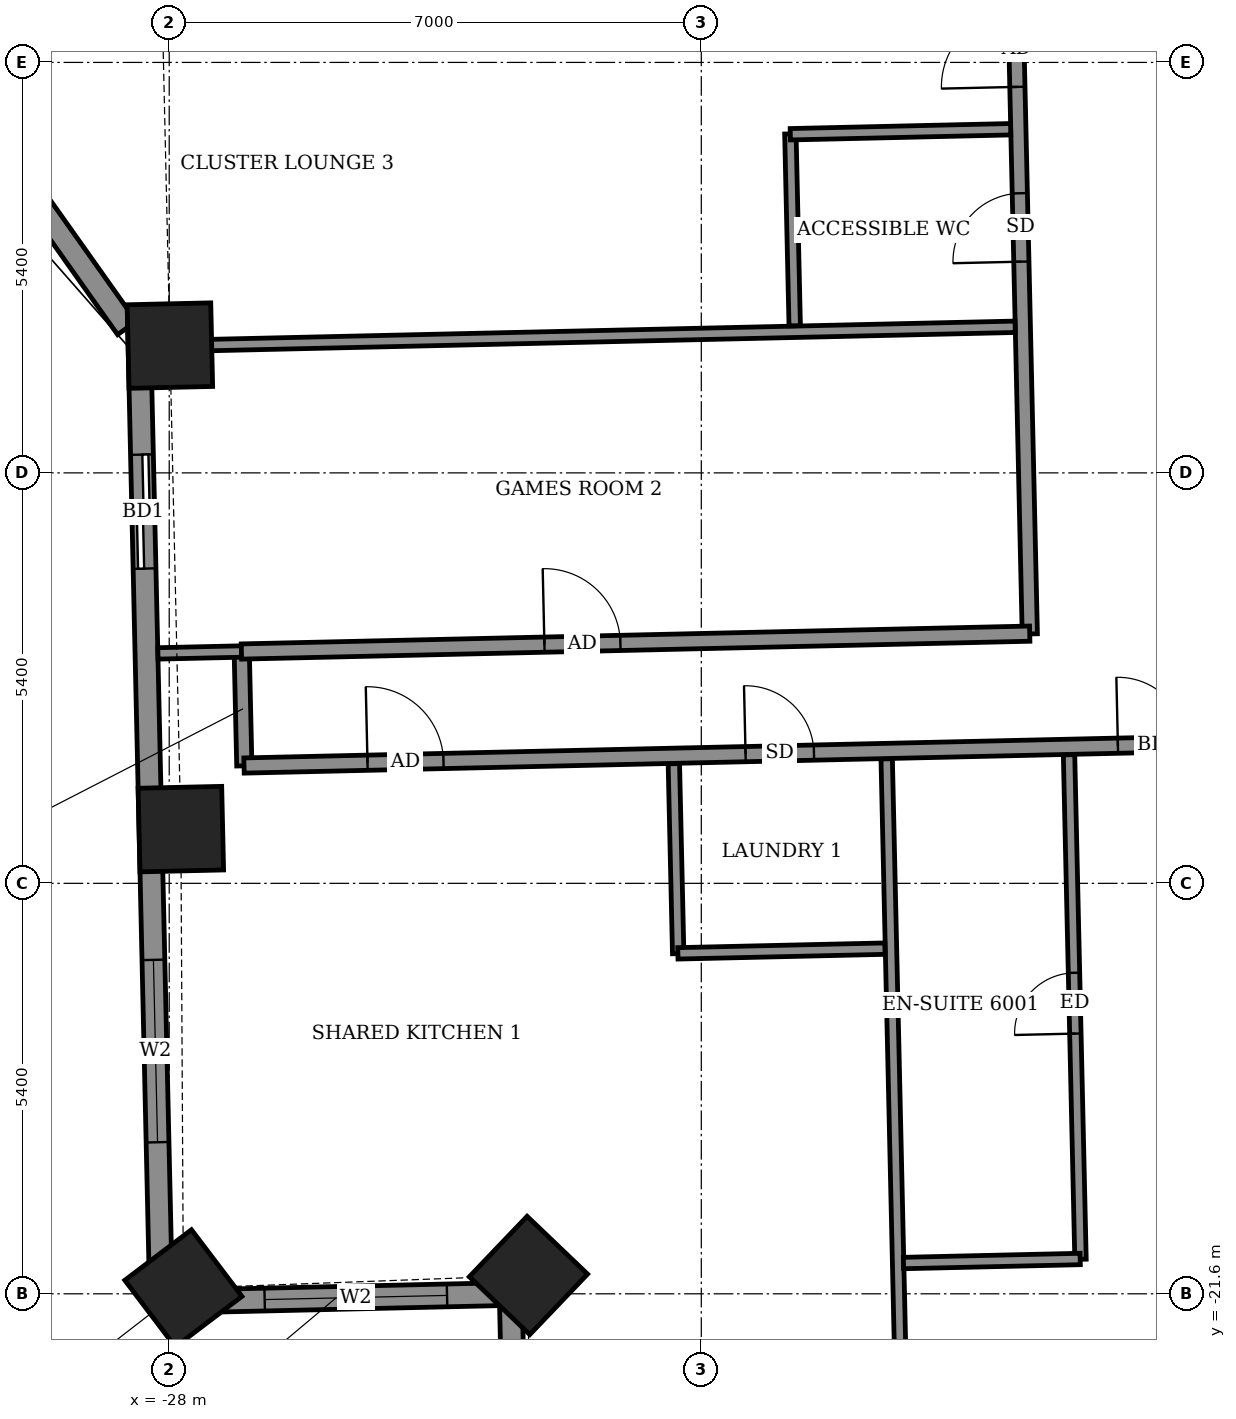
"""IFC4 building model, lengths in metres.
Left out: names, types, materials, properties, quantities, classifications, styles, units other than length and angle.
Written with IfcOpenShell. Run it as: python <this file> out.ifc"""

import sys

from ifc_helpers import new_model, si_unit, direction, frame, frame_2d, origin, origin_2d, place, context, subcontext, project, spatial, rectangle, extrude, element, fill, save


model = new_model("IFC4")
c1 = context("Model", 3, precision=1e-05, world=origin(), true_north=direction((0.0, 1.0)))
c2 = subcontext(c1, "Body", "Model", "MODEL_VIEW")
j1 = project(units=[si_unit("LENGTHUNIT", "METRE"), si_unit("PLANEANGLEUNIT", "RADIAN")], contexts=[c1])
p1 = place(None, origin())
s1 = spatial("IfcSite", under=j1, at=p1, CompositionType="ELEMENT")
p2 = place(p1, origin())
s2 = spatial("IfcBuilding", under=s1, at=p2, CompositionType="ELEMENT")
p3 = place(p2, frame((0.0, 0.0, 238.3)))
s3 = spatial("IfcBuildingStorey", under=s2, at=p3, CompositionType="ELEMENT", Elevation=238.3)
for number, where, z_axis, x_axis in (
    (1, (-27.991, -9.125, -0.55), (0.0, 0.0, 1.0), (0.023, -1.0, 0.0)),
    (2, (-27.847, -15.487, -0.55), (0.0, 0.0, 1.0), (0.023, -1.0, 0.0)),
    (3, (-27.814, -21.528, -0.55), (0.0, 0.0, 1.0), (0.604, -0.797, 0.0)),
    (4, (-23.274, -21.358, -0.55), (0.0, 0.0, 1.0), (0.723, -0.691, 0.0)),
):
    element("IfcColumn", number, at=place(p3, frame(where, z_axis=z_axis, x_axis=x_axis)), inside=s3, PredefinedType="COLUMN", context=c2, shape_type="SweptSolid", body=[
        extrude(rectangle(XDim=1.1, YDim=1.1, at=origin_2d()), origin(), (0.0, 0.0, 1.0), 3.6),
    ])
p4 = place(p3, frame((-30.62, -5.982, 0.0), z_axis=(0.0, 0.0, 1.0), x_axis=(0.578108441206, -0.815959943996, 0.0)))
e5 = element("IfcWall", 5, at=p4, inside=s3, PredefinedType="SOLIDWALL", context=c2, shape_type="SweptSolid", body=[
    extrude(rectangle(XDim=3.569, YDim=0.3, at=frame_2d((1.784, 0.0))), origin(), (0.0, 0.0, 1.0), 3.05),
])
p5 = place(p4, frame((0.338, 0.0, 0.9)))
e6 = element("IfcOpeningElement", 6, at=p5, cuts=e5, PredefinedType="OPENING", context=c2, shape_type="SweptSolid", body=[
    extrude(rectangle(XDim=1.2, YDim=1.5, at=frame_2d((0.6, 0.75))), frame((0.0, 0.16, 0.0), z_axis=(0.0, -1.0, 0.0), x_axis=(1.0, 0.0, 0.0)), (0.0, 0.0, 1.0), 0.32),
])
p6 = place(p3, frame((-28.403, -8.61, 0.0), z_axis=(0.0, 0.0, 1.0), x_axis=(0.022680342038, -0.999742767958, 0.0)))
e7 = element("IfcWall", 7, at=p6, inside=s3, PredefinedType="SOLIDWALL", context=c2, shape_type="SweptSolid", body=[
    extrude(rectangle(XDim=13.1, YDim=0.3, at=frame_2d((6.55, 0.0))), origin(), (0.0, 0.0, 1.0), 2.55),
])
p7 = place(p6, frame((1.95, 0.0, 0.0)))
e8 = element("IfcOpeningElement", 8, at=p7, cuts=e7, PredefinedType="OPENING", context=c2, shape_type="SweptSolid", body=[
    extrude(rectangle(XDim=1.5, YDim=2.4, at=frame_2d((0.75, 1.2))), frame((0.0, 0.16, 0.0), z_axis=(0.0, -1.0, 0.0), x_axis=(1.0, 0.0, 0.0)), (0.0, 0.0, 1.0), 0.32),
])
p8 = place(p6, frame((8.599, 0.0, 0.9)))
e9 = element("IfcOpeningElement", 9, at=p8, cuts=e7, PredefinedType="OPENING", context=c2, shape_type="SweptSolid", body=[
    extrude(rectangle(XDim=2.4, YDim=1.5, at=frame_2d((1.2, 0.75))), frame((0.0, 0.16, 0.0), z_axis=(0.0, -1.0, 0.0), x_axis=(1.0, 0.0, 0.0)), (0.0, 0.0, 1.0), 0.32),
])
p9 = place(p3, frame((-28.106, -21.707, 0.0), z_axis=(0.0, 0.0, 1.0), x_axis=(0.999739556364, 0.022821468877, 0.0)))
e10 = element("IfcWall", 10, at=p9, inside=s3, PredefinedType="SOLIDWALL", context=c2, shape_type="SweptSolid", body=[
    extrude(rectangle(XDim=4.6, YDim=0.3, at=frame_2d((2.3, 0.0))), origin(), (0.0, 0.0, 1.0), 2.55),
])
p10 = place(p9, frame((1.362, 0.0, 0.9)))
e11 = element("IfcOpeningElement", 11, at=p10, cuts=e10, PredefinedType="OPENING", context=c2, shape_type="SweptSolid", body=[
    extrude(rectangle(XDim=2.4, YDim=1.5, at=frame_2d((1.2, 0.75))), frame((0.0, 0.16, 0.0), z_axis=(0.0, -1.0, 0.0), x_axis=(1.0, 0.0, 0.0)), (0.0, 0.0, 1.0), 0.32),
])
p11 = place(p3, frame((-23.507, -21.602, 0.0), z_axis=(0.0, 0.0, 1.0), x_axis=(0.022609285172, -0.999744377441, 0.0)))
e12 = element("IfcWall", 12, at=p11, inside=s3, PredefinedType="SOLIDWALL", context=c2, shape_type="SweptSolid", body=[
    extrude(rectangle(XDim=4.6, YDim=0.3, at=frame_2d((2.3, 0.0))), origin(), (0.0, 0.0, 1.0), 2.55),
])
p12 = place(p11, frame((0.832, 0.0, 0.9)))
e13 = element("IfcOpeningElement", 13, at=p12, cuts=e12, PredefinedType="OPENING", context=c2, shape_type="SweptSolid", body=[
    extrude(rectangle(XDim=2.4, YDim=1.5, at=frame_2d((1.2, 0.75))), frame((0.0, 0.16, 0.0), z_axis=(0.0, -1.0, 0.0), x_axis=(1.0, 0.0, 0.0)), (0.0, 0.0, 1.0), 0.32),
])
p13 = place(p3, frame((-18.303, -25.935, 0.0), z_axis=(0.0, 0.0, 1.0), x_axis=(-0.022684355347, 0.999742676904, 0.0)))
e14 = element("IfcWall", 14, at=p13, inside=s3, PredefinedType="PARTITIONING", context=c2, shape_type="SweptSolid", body=[
    extrude(rectangle(XDim=11.376, YDim=0.15, at=frame_2d((5.688, 0.0))), origin(), (0.0, 0.0, 1.0), 2.55),
])
p14 = place(p3, frame((-16.011, -21.146, 0.0), z_axis=(0.0, 0.0, 1.0), x_axis=(-0.022760662159, 0.999740942574, 0.0)))
e15 = element("IfcWall", 15, at=p14, inside=s3, PredefinedType="PARTITIONING", context=c2, shape_type="SweptSolid", body=[
    extrude(rectangle(XDim=6.64, YDim=0.15, at=frame_2d((3.32, 0.0))), origin(), (0.0, 0.0, 1.0), 3.05),
])
p15 = place(p14, frame((2.97, 0.0, 0.0)))
e16 = element("IfcOpeningElement", 16, at=p15, cuts=e15, PredefinedType="OPENING", context=c2, shape_type="SweptSolid", body=[
    extrude(rectangle(XDim=0.8, YDim=2.1, at=frame_2d((0.4, 1.05))), frame((0.0, 0.085, 0.0), z_axis=(0.0, -1.0, 0.0), x_axis=(1.0, 0.0, 0.0)), (0.0, 0.0, 1.0), 0.17),
])
p16 = place(p3, frame((-18.34, -21.195, 0.0), z_axis=(0.0, 0.0, 1.0), x_axis=(0.99974053329, 0.022778632478, 0.0)))
e17 = element("IfcWall", 17, at=p16, inside=s3, PredefinedType="PARTITIONING", context=c2, shape_type="SweptSolid", body=[
    extrude(rectangle(XDim=2.326, YDim=0.15, at=frame_2d((1.163, 0.0))), origin(), (0.0, 0.0, 1.0), 3.05),
])
p17 = place(p3, frame((-21.304, -17.125, 0.0), z_axis=(0.0, 0.0, 1.0), x_axis=(-0.022854521249, 0.999738801317, 0.0)))
e18 = element("IfcWall", 18, at=p17, inside=s3, PredefinedType="PARTITIONING", context=c2, shape_type="SweptSolid", body=[
    extrude(rectangle(XDim=2.5, YDim=0.15, at=frame_2d((1.25, 0.0))), origin(), (0.0, 0.0, 1.0), 3.05),
])
p18 = place(p3, frame((-21.308, -17.121, 0.0), z_axis=(0.0, 0.0, 1.0), x_axis=(0.999741002259, 0.022758040381, 0.0)))
e19 = element("IfcWall", 19, at=p18, inside=s3, PredefinedType="PARTITIONING", context=c2, shape_type="SweptSolid", body=[
    extrude(rectangle(XDim=2.725, YDim=0.15, at=frame_2d((1.362, 0.0))), origin(), (0.0, 0.0, 1.0), 3.05),
])
p19 = place(p3, frame((-27.012, -14.654, 0.0), z_axis=(0.0, 0.0, 1.0), x_axis=(-0.022617910375, 0.999744182344, 0.0)))
e20 = element("IfcWall", 20, at=p19, inside=s3, PredefinedType="PARTITIONING", context=c2, shape_type="SweptSolid", body=[
    extrude(rectangle(XDim=1.5, YDim=0.2, at=frame_2d((0.75, 0.0))), origin(), (0.0, 0.0, 1.0), 3.05),
])
p20 = place(p3, frame((-27.016, -14.65, 0.0), z_axis=(0.0, 0.0, 1.0), x_axis=(0.999742623033, 0.022686729391, 0.0)))
e21 = element("IfcWall", 21, at=p20, inside=s3, PredefinedType="PARTITIONING", context=c2, shape_type="SweptSolid", body=[
    extrude(rectangle(XDim=50.858, YDim=0.2, at=frame_2d((25.429, 0.0))), origin(), (0.0, 0.0, 1.0), 3.05),
])
p21 = place(p20, frame((1.625, 0.0, 0.0)))
e22 = element("IfcOpeningElement", 22, at=p21, cuts=e21, PredefinedType="OPENING", context=c2, shape_type="SweptSolid", body=[
    extrude(rectangle(XDim=1.0, YDim=2.1, at=frame_2d((0.5, 1.05))), frame((0.0, 0.11, 0.0), z_axis=(0.0, -1.0, 0.0), x_axis=(1.0, 0.0, 0.0)), (0.0, 0.0, 1.0), 0.22),
])
p22 = place(p20, frame((6.6, 0.0, 0.0)))
e23 = element("IfcOpeningElement", 23, at=p22, cuts=e21, PredefinedType="OPENING", context=c2, shape_type="SweptSolid", body=[
    extrude(rectangle(XDim=0.9, YDim=2.1, at=frame_2d((0.45, 1.05))), frame((0.0, 0.11, 0.0), z_axis=(0.0, -1.0, 0.0), x_axis=(1.0, 0.0, 0.0)), (0.0, 0.0, 1.0), 0.22),
])
p23 = place(p20, frame((11.5, 0.0, 0.0)))
e24 = element("IfcOpeningElement", 24, at=p23, cuts=e21, PredefinedType="OPENING", context=c2, shape_type="SweptSolid", body=[
    extrude(rectangle(XDim=0.9, YDim=2.1, at=frame_2d((0.45, 1.05))), frame((0.0, 0.11, 0.0), z_axis=(0.0, -1.0, 0.0), x_axis=(1.0, 0.0, 0.0)), (0.0, 0.0, 1.0), 0.22),
])
p24 = place(p20, frame((13.675, 0.0, 0.0)))
e25 = element("IfcOpeningElement", 25, at=p24, cuts=e21, PredefinedType="OPENING", context=c2, shape_type="SweptSolid", body=[
    extrude(rectangle(XDim=0.9, YDim=2.1, at=frame_2d((0.45, 1.05))), frame((0.0, 0.11, 0.0), z_axis=(0.0, -1.0, 0.0), x_axis=(1.0, 0.0, 0.0)), (0.0, 0.0, 1.0), 0.22),
])
p25 = place(p20, frame((20.625, 0.0, 0.0)))
e26 = element("IfcOpeningElement", 26, at=p25, cuts=e21, PredefinedType="OPENING", context=c2, shape_type="SweptSolid", body=[
    extrude(rectangle(XDim=0.9, YDim=2.1, at=frame_2d((0.45, 1.05))), frame((0.0, 0.11, 0.0), z_axis=(0.0, -1.0, 0.0), x_axis=(1.0, 0.0, 0.0)), (0.0, 0.0, 1.0), 0.22),
])
p26 = place(p20, frame((22.775, 0.0, 0.0)))
e27 = element("IfcOpeningElement", 27, at=p26, cuts=e21, PredefinedType="OPENING", context=c2, shape_type="SweptSolid", body=[
    extrude(rectangle(XDim=0.9, YDim=2.1, at=frame_2d((0.45, 1.05))), frame((0.0, 0.11, 0.0), z_axis=(0.0, -1.0, 0.0), x_axis=(1.0, 0.0, 0.0)), (0.0, 0.0, 1.0), 0.22),
])
p27 = place(p20, frame((29.65, 0.0, 0.0)))
e28 = element("IfcOpeningElement", 28, at=p27, cuts=e21, PredefinedType="OPENING", context=c2, shape_type="SweptSolid", body=[
    extrude(rectangle(XDim=0.9, YDim=2.1, at=frame_2d((0.45, 1.05))), frame((0.0, 0.11, 0.0), z_axis=(0.0, -1.0, 0.0), x_axis=(1.0, 0.0, 0.0)), (0.0, 0.0, 1.0), 0.22),
])
p28 = place(p20, frame((31.625, 0.0, 0.0)))
e29 = element("IfcOpeningElement", 29, at=p28, cuts=e21, PredefinedType="OPENING", context=c2, shape_type="SweptSolid", body=[
    extrude(rectangle(XDim=0.9, YDim=2.1, at=frame_2d((0.45, 1.05))), frame((0.0, 0.11, 0.0), z_axis=(0.0, -1.0, 0.0), x_axis=(1.0, 0.0, 0.0)), (0.0, 0.0, 1.0), 0.22),
])
p29 = place(p20, frame((38.5, 0.0, 0.0)))
e30 = element("IfcOpeningElement", 30, at=p29, cuts=e21, PredefinedType="OPENING", context=c2, shape_type="SweptSolid", body=[
    extrude(rectangle(XDim=0.9, YDim=2.1, at=frame_2d((0.45, 1.05))), frame((0.0, 0.11, 0.0), z_axis=(0.0, -1.0, 0.0), x_axis=(1.0, 0.0, 0.0)), (0.0, 0.0, 1.0), 0.22),
])
p30 = place(p20, frame((40.55, 0.0, 0.0)))
e31 = element("IfcOpeningElement", 31, at=p30, cuts=e21, PredefinedType="OPENING", context=c2, shape_type="SweptSolid", body=[
    extrude(rectangle(XDim=0.9, YDim=2.1, at=frame_2d((0.45, 1.05))), frame((0.0, 0.11, 0.0), z_axis=(0.0, -1.0, 0.0), x_axis=(1.0, 0.0, 0.0)), (0.0, 0.0, 1.0), 0.22),
])
p31 = place(p20, frame((47.601, 0.0, 0.0)))
e32 = element("IfcOpeningElement", 32, at=p31, cuts=e21, PredefinedType="OPENING", context=c2, shape_type="SweptSolid", body=[
    extrude(rectangle(XDim=1.0, YDim=2.1, at=frame_2d((0.5, 1.05))), frame((0.0, 0.11, 0.0), z_axis=(0.0, -1.0, 0.0), x_axis=(1.0, 0.0, 0.0)), (0.0, 0.0, 1.0), 0.22),
])
p32 = place(p3, frame((-16.678, -12.919, 0.0), z_axis=(0.0, 0.0, 1.0), x_axis=(-0.022696191528, 0.999742408268, 0.0)))
e33 = element("IfcWall", 33, at=p32, inside=s3, PredefinedType="PARTITIONING", context=c2, shape_type="SweptSolid", body=[
    extrude(rectangle(XDim=25.074, YDim=0.2, at=frame_2d((12.537, 0.0))), origin(), (0.0, 0.0, 1.0), 3.05),
])
p33 = place(p32, frame((21.237, 0.0, 0.0)))
e34 = element("IfcOpeningElement", 34, at=p33, cuts=e33, PredefinedType="OPENING", context=c2, shape_type="SweptSolid", body=[
    extrude(rectangle(XDim=1.0, YDim=2.1, at=frame_2d((0.5, 1.05))), frame((0.0, 0.11, 0.0), z_axis=(0.0, -1.0, 0.0), x_axis=(1.0, 0.0, 0.0)), (0.0, 0.0, 1.0), 0.22),
])
p34 = place(p32, frame((23.424, 0.0, 0.0)))
e35 = element("IfcOpeningElement", 35, at=p34, cuts=e33, PredefinedType="OPENING", context=c2, shape_type="SweptSolid", body=[
    extrude(rectangle(XDim=0.9, YDim=2.1, at=frame_2d((0.45, 1.05))), frame((0.0, 0.11, 0.0), z_axis=(0.0, -1.0, 0.0), x_axis=(1.0, 0.0, 0.0)), (0.0, 0.0, 1.0), 0.22),
])
p35 = place(p32, frame((18.799, 0.0, 0.0)))
e36 = element("IfcOpeningElement", 36, at=p35, cuts=e33, PredefinedType="OPENING", context=c2, shape_type="SweptSolid", body=[
    extrude(rectangle(XDim=1.0, YDim=2.1, at=frame_2d((0.5, 1.05))), frame((0.0, 0.11, 0.0), z_axis=(0.0, -1.0, 0.0), x_axis=(1.0, 0.0, 0.0)), (0.0, 0.0, 1.0), 0.22),
])
p36 = place(p32, frame((15.759, 0.0, 0.0)))
e37 = element("IfcOpeningElement", 37, at=p36, cuts=e33, PredefinedType="OPENING", context=c2, shape_type="SweptSolid", body=[
    extrude(rectangle(XDim=1.0, YDim=2.1, at=frame_2d((0.5, 1.05))), frame((0.0, 0.11, 0.0), z_axis=(0.0, -1.0, 0.0), x_axis=(1.0, 0.0, 0.0)), (0.0, 0.0, 1.0), 0.22),
])
p37 = place(p32, frame((12.76, 0.0, 0.0)))
e38 = element("IfcOpeningElement", 38, at=p37, cuts=e33, PredefinedType="OPENING", context=c2, shape_type="SweptSolid", body=[
    extrude(rectangle(XDim=1.0, YDim=2.1, at=frame_2d((0.5, 1.05))), frame((0.0, 0.11, 0.0), z_axis=(0.0, -1.0, 0.0), x_axis=(1.0, 0.0, 0.0)), (0.0, 0.0, 1.0), 0.22),
])
p38 = place(p32, frame((9.752, 0.0, 0.0)))
e39 = element("IfcOpeningElement", 39, at=p38, cuts=e33, PredefinedType="OPENING", context=c2, shape_type="SweptSolid", body=[
    extrude(rectangle(XDim=1.0, YDim=2.1, at=frame_2d((0.5, 1.05))), frame((0.0, 0.11, 0.0), z_axis=(0.0, -1.0, 0.0), x_axis=(1.0, 0.0, 0.0)), (0.0, 0.0, 1.0), 0.22),
])
p39 = place(p32, frame((7.199, 0.0, 0.0)))
e40 = element("IfcOpeningElement", 40, at=p39, cuts=e33, PredefinedType="OPENING", context=c2, shape_type="SweptSolid", body=[
    extrude(rectangle(XDim=1.0, YDim=2.1, at=frame_2d((0.5, 1.05))), frame((0.0, 0.11, 0.0), z_axis=(0.0, -1.0, 0.0), x_axis=(1.0, 0.0, 0.0)), (0.0, 0.0, 1.0), 0.22),
])
p40 = place(p32, frame((4.899, 0.0, 0.0)))
e41 = element("IfcOpeningElement", 41, at=p40, cuts=e33, PredefinedType="OPENING", context=c2, shape_type="SweptSolid", body=[
    extrude(rectangle(XDim=0.9, YDim=2.1, at=frame_2d((0.45, 1.05))), frame((0.0, 0.11, 0.0), z_axis=(0.0, -1.0, 0.0), x_axis=(1.0, 0.0, 0.0)), (0.0, 0.0, 1.0), 0.22),
])
p41 = place(p3, frame((-28.149, -13.175, 0.0), z_axis=(0.0, 0.0, 1.0), x_axis=(0.999740233734, 0.022791776024, 0.0)))
e42 = element("IfcWall", 42, at=p41, inside=s3, PredefinedType="PARTITIONING", context=c2, shape_type="SweptSolid", body=[
    extrude(rectangle(XDim=1.103, YDim=0.15, at=frame_2d((0.552, 0.0))), origin(), (0.0, 0.0, 1.0), 2.55),
])
p42 = place(p3, frame((-27.05, -13.15, 0.0), z_axis=(0.0, 0.0, 1.0), x_axis=(0.999743679035, 0.022640146404, 0.0)))
e43 = element("IfcWall", 43, at=p42, inside=s3, PredefinedType="PARTITIONING", context=c2, shape_type="SweptSolid", body=[
    extrude(rectangle(XDim=10.374, YDim=0.2, at=frame_2d((5.187, 0.0))), origin(), (0.0, 0.0, 1.0), 3.05),
])
p43 = place(p42, frame((3.987, 0.0, 0.0)))
e44 = element("IfcOpeningElement", 44, at=p43, cuts=e43, PredefinedType="OPENING", context=c2, shape_type="SweptSolid", body=[
    extrude(rectangle(XDim=1.0, YDim=2.1, at=frame_2d((0.5, 1.05))), frame((0.0, 0.11, 0.0), z_axis=(0.0, -1.0, 0.0), x_axis=(1.0, 0.0, 0.0)), (0.0, 0.0, 1.0), 0.22),
])
p44 = place(p3, frame((-28.241, -9.136, 0.0), z_axis=(0.0, 0.0, 1.0), x_axis=(0.999742533279, 0.022690684282, 0.0)))
e45 = element("IfcWall", 45, at=p44, inside=s3, PredefinedType="PARTITIONING", context=c2, shape_type="SweptSolid", body=[
    extrude(rectangle(XDim=11.373, YDim=0.15, at=frame_2d((5.687, 0.0))), origin(), (0.0, 0.0, 1.0), 3.05),
])
p45 = place(p3, frame((-19.771, -8.864, 0.0), z_axis=(0.0, 0.0, 1.0), x_axis=(-0.022532486354, 0.9997461113, 0.0)))
e46 = element("IfcWall", 46, at=p45, inside=s3, PredefinedType="PARTITIONING", context=c2, shape_type="SweptSolid", body=[
    extrude(rectangle(XDim=2.525, YDim=0.15, at=frame_2d((1.262, 0.0))), origin(), (0.0, 0.0, 1.0), 3.05),
])
p46 = place(p3, frame((-19.829, -6.345, 0.0), z_axis=(0.0, 0.0, 1.0), x_axis=(0.999741618182, 0.022730967319, 0.0)))
e47 = element("IfcWall", 47, at=p46, inside=s3, PredefinedType="PARTITIONING", context=c2, shape_type="SweptSolid", body=[
    extrude(rectangle(XDim=2.9, YDim=0.15, at=frame_2d((1.45, 0.0))), origin(), (0.0, 0.0, 1.0), 3.05),
])
p47 = place(p7, origin())
e48 = element("IfcDoor", 48, at=p47, inside=s3, OperationType="SLIDING_TO_LEFT", PredefinedType="DOOR", context=c2, shape_type="SweptSolid", body=[
    extrude(rectangle(XDim=1.5, YDim=2.4, at=frame_2d((0.75, 1.2))), frame((0.0, 0.025, 0.0), z_axis=(0.0, -1.0, 0.0), x_axis=(1.0, 0.0, 0.0)), (0.0, 0.0, 1.0), 0.05),
])
fill(e8, e48)
p48 = place(p8, origin())
e49 = element("IfcWindow", 49, at=p48, inside=s3, PartitioningType="DOUBLE_PANEL_VERTICAL", PredefinedType="WINDOW", context=c2, shape_type="SweptSolid", body=[
    extrude(rectangle(XDim=2.4, YDim=1.5, at=frame_2d((1.2, 0.75))), frame((0.0, 0.03, 0.0), z_axis=(0.0, -1.0, 0.0), x_axis=(1.0, 0.0, 0.0)), (0.0, 0.0, 1.0), 0.06),
])
fill(e9, e49)
p49 = place(p10, origin())
e50 = element("IfcWindow", 50, at=p49, inside=s3, PartitioningType="DOUBLE_PANEL_VERTICAL", PredefinedType="WINDOW", context=c2, shape_type="SweptSolid", body=[
    extrude(rectangle(XDim=2.4, YDim=1.5, at=frame_2d((1.2, 0.75))), frame((0.0, 0.03, 0.0), z_axis=(0.0, -1.0, 0.0), x_axis=(1.0, 0.0, 0.0)), (0.0, 0.0, 1.0), 0.06),
])
fill(e11, e50)
p50 = place(p21, origin())
e51 = element("IfcDoor", 51, at=p50, inside=s3, OperationType="SINGLE_SWING_LEFT", PredefinedType="DOOR", context=c2, shape_type="SweptSolid", body=[
    extrude(rectangle(XDim=1.0, YDim=2.1, at=frame_2d((0.5, 1.05))), frame((0.0, 0.025, 0.0), z_axis=(0.0, -1.0, 0.0), x_axis=(1.0, 0.0, 0.0)), (0.0, 0.0, 1.0), 0.05),
])
fill(e22, e51)
p51 = place(p22, origin())
e52 = element("IfcDoor", 52, at=p51, inside=s3, OperationType="SINGLE_SWING_LEFT", PredefinedType="DOOR", context=c2, shape_type="SweptSolid", body=[
    extrude(rectangle(XDim=0.9, YDim=2.1, at=frame_2d((0.45, 1.05))), frame((0.0, 0.025, 0.0), z_axis=(0.0, -1.0, 0.0), x_axis=(1.0, 0.0, 0.0)), (0.0, 0.0, 1.0), 0.05),
])
fill(e23, e52)
p52 = place(p23, origin())
e53 = element("IfcDoor", 53, at=p52, inside=s3, OperationType="SINGLE_SWING_LEFT", PredefinedType="DOOR", context=c2, shape_type="SweptSolid", body=[
    extrude(rectangle(XDim=0.9, YDim=2.1, at=frame_2d((0.45, 1.05))), frame((0.0, 0.025, 0.0), z_axis=(0.0, -1.0, 0.0), x_axis=(1.0, 0.0, 0.0)), (0.0, 0.0, 1.0), 0.05),
])
fill(e24, e53)
p53 = place(p15, origin())
e54 = element("IfcDoor", 54, at=p53, inside=s3, OperationType="SINGLE_SWING_LEFT", PredefinedType="DOOR", context=c2, shape_type="SweptSolid", body=[
    extrude(rectangle(XDim=0.8, YDim=2.1, at=frame_2d((0.4, 1.05))), frame((0.0, 0.025, 0.0), z_axis=(0.0, -1.0, 0.0), x_axis=(1.0, 0.0, 0.0)), (0.0, 0.0, 1.0), 0.05),
])
fill(e16, e54)
p54 = place(p39, origin())
e55 = element("IfcDoor", 55, at=p54, inside=s3, OperationType="SINGLE_SWING_RIGHT", PredefinedType="DOOR", context=c2, shape_type="SweptSolid", body=[
    extrude(rectangle(XDim=1.0, YDim=2.1, at=frame_2d((0.5, 1.05))), frame((0.0, 0.025, 0.0), z_axis=(0.0, -1.0, 0.0), x_axis=(1.0, 0.0, 0.0)), (0.0, 0.0, 1.0), 0.05),
])
fill(e40, e55)
p55 = place(p40, origin())
e56 = element("IfcDoor", 56, at=p55, inside=s3, OperationType="SINGLE_SWING_LEFT", PredefinedType="DOOR", context=c2, shape_type="SweptSolid", body=[
    extrude(rectangle(XDim=0.9, YDim=2.1, at=frame_2d((0.45, 1.05))), frame((0.0, 0.025, 0.0), z_axis=(0.0, -1.0, 0.0), x_axis=(1.0, 0.0, 0.0)), (0.0, 0.0, 1.0), 0.05),
])
fill(e41, e56)
p56 = place(p43, origin())
e57 = element("IfcDoor", 57, at=p56, inside=s3, OperationType="SINGLE_SWING_LEFT", PredefinedType="DOOR", context=c2, shape_type="SweptSolid", body=[
    extrude(rectangle(XDim=1.0, YDim=2.1, at=frame_2d((0.5, 1.05))), frame((0.0, 0.025, 0.0), z_axis=(0.0, -1.0, 0.0), x_axis=(1.0, 0.0, 0.0)), (0.0, 0.0, 1.0), 0.05),
])
fill(e44, e57)
save(model, sys.argv[1])
